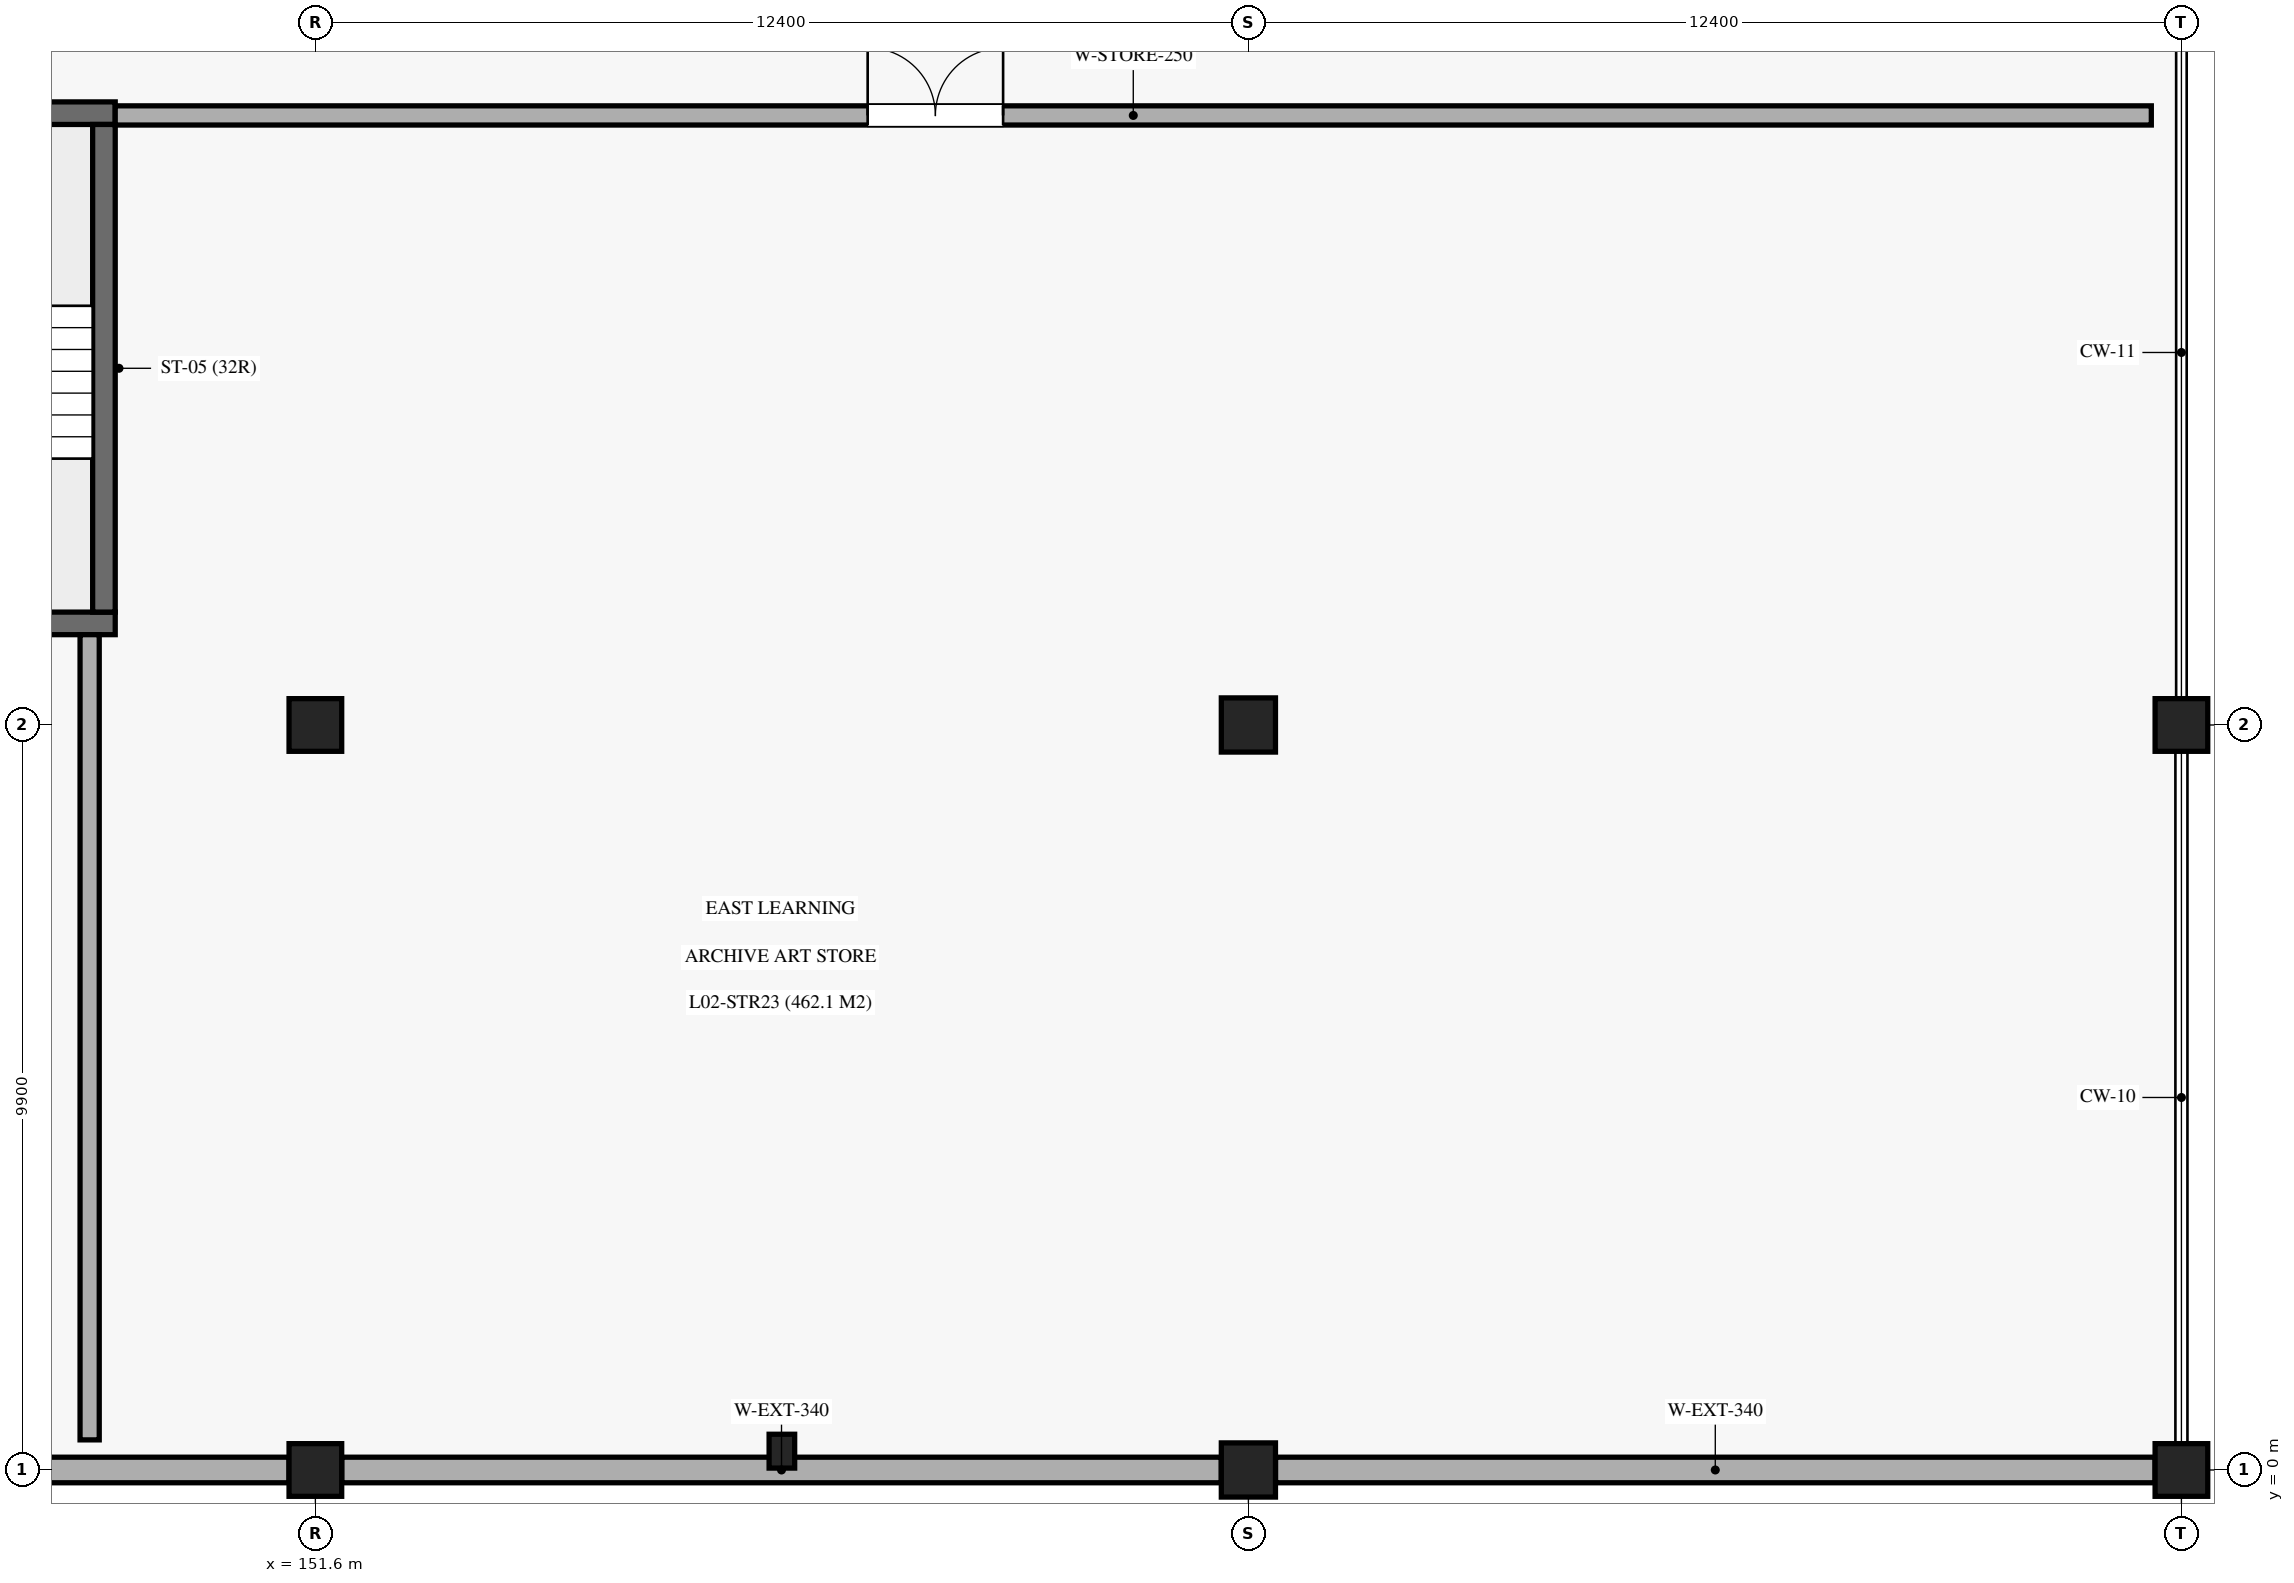
"""IFC4 building model, lengths in metres.
Left out: names, types, materials, properties, quantities, classifications, styles, units other than length and angle.
Written with IfcOpenShell. Run it as: python <this file> out.ifc"""

import sys

from ifc_helpers import new_model, si_unit, direction, frame, frame_2d, origin, origin_2d, place, context, subcontext, project, spatial, rectangle, circle, extrude, element, fill, save


model = new_model("IFC4")
c1 = context("Model", 3, precision=1e-05, world=origin(), true_north=direction((0.0, 1.0)))
c2 = subcontext(c1, "Body", "Model", "MODEL_VIEW")
j1 = project(units=[si_unit("LENGTHUNIT", "METRE"), si_unit("PLANEANGLEUNIT", "RADIAN")], contexts=[c1])
p1 = place(None, origin())
s1 = spatial("IfcSite", under=j1, at=p1, CompositionType="ELEMENT")
p2 = place(p1, origin())
s2 = spatial("IfcBuilding", under=s1, at=p2, CompositionType="ELEMENT")
p3 = place(p2, frame((0.0, 0.0, 10.88)))
s3 = spatial("IfcBuildingStorey", under=s2, at=p3, CompositionType="ELEMENT", Elevation=10.88)
for number, where, z_axis, x_axis in (
    (1, (151.6, 0.0, 0.0), (0.0, 0.0, 1.0), (1.0, 0.0, 0.0)),
    (2, (151.6, 9.9, 0.0), (0.0, 0.0, 1.0), (1.0, 0.0, 0.0)),
):
    element("IfcColumn", number, at=place(p3, frame(where, z_axis=z_axis, x_axis=x_axis)), inside=s3, PredefinedType="COLUMN", context=c2, shape_type="SweptSolid", body=[
        extrude(rectangle(XDim=0.7, YDim=0.7, at=origin_2d()), origin(), (0.0, 0.0, 1.0), 5.44),
    ])
for number, where, z_axis, x_axis in (
    (3, (164.0, 0.0, 0.0), (0.0, 0.0, 1.0), (1.0, 0.0, 0.0)),
    (4, (164.0, 9.9, 0.0), (0.0, 0.0, 1.0), (1.0, 0.0, 0.0)),
):
    element("IfcColumn", number, at=place(p3, frame(where, z_axis=z_axis, x_axis=x_axis)), inside=s3, PredefinedType="COLUMN", context=c2, shape_type="SweptSolid", body=[
        extrude(circle(Radius=0.36, at=origin_2d()), origin(), (0.0, 0.0, 1.0), 5.44),
    ])
for number, where, z_axis, x_axis in (
    (5, (176.4, 0.0, 0.0), (0.0, 0.0, 1.0), (1.0, 0.0, 0.0)),
    (6, (176.4, 9.9, 0.0), (0.0, 0.0, 1.0), (1.0, 0.0, 0.0)),
):
    element("IfcColumn", number, at=place(p3, frame(where, z_axis=z_axis, x_axis=x_axis)), inside=s3, PredefinedType="COLUMN", context=c2, shape_type="SweptSolid", body=[
        extrude(rectangle(XDim=0.7, YDim=0.7, at=origin_2d()), origin(), (0.0, 0.0, 1.0), 5.44),
    ])
p4 = place(p3, frame((157.8, 0.25, 0.0), z_axis=(0.0, 0.0, 1.0), x_axis=(1.0, 0.0, 0.0)))
e7 = element("IfcColumn", 7, at=p4, inside=s3, PredefinedType="PILASTER", context=c2, shape_type="SweptSolid", body=[
    extrude(rectangle(XDim=0.34, YDim=0.45, at=origin_2d()), origin(), (0.0, 0.0, 1.0), 5.44),
])
p5 = place(p3, frame((139.55, 0.0, 0.0), z_axis=(0.0, 0.0, 1.0), x_axis=(1.0, 0.0, 0.0)))
e8 = element("IfcWall", 8, at=p5, inside=s3, PredefinedType="SOLIDWALL", context=c2, shape_type="SweptSolid", body=[
    extrude(rectangle(XDim=11.7, YDim=0.34, at=frame_2d((5.85, 0.0))), origin(), (0.0, 0.0, 1.0), 4.38),
])
for number, where, z_axis, x_axis in (
    (9, (151.95, 0.0, 0.0), (0.0, 0.0, 1.0), (1.0, 0.0, 0.0)),
    (10, (164.36, 0.0, 0.0), (0.0, 0.0, 1.0), (1.0, 0.0, 0.0)),
):
    element("IfcWall", number, at=place(p3, frame(where, z_axis=z_axis, x_axis=x_axis)), inside=s3, PredefinedType="SOLIDWALL", context=c2, shape_type="SweptSolid", body=[
        extrude(rectangle(XDim=11.69, YDim=0.34, at=frame_2d((5.845, 0.0))), origin(), (0.0, 0.0, 1.0), 4.38),
    ])
for number, where, z_axis, x_axis in (
    (11, (141.86, 11.25, 0.0), (0.0, 0.0, 1.0), (1.0, 0.0, 0.0)),
    (12, (141.86, 18.03, 0.0), (0.0, 0.0, 1.0), (1.0, 0.0, 0.0)),
):
    element("IfcWall", number, at=place(p3, frame(where, z_axis=z_axis, x_axis=x_axis)), inside=s3, PredefinedType="SHEAR", context=c2, shape_type="SweptSolid", body=[
        extrude(rectangle(XDim=7.08, YDim=0.3, at=frame_2d((3.54, 0.0))), origin(), (0.0, 0.0, 1.0), 5.16),
    ])
p6 = place(p3, frame((148.79, 11.4, 0.0), z_axis=(0.0, 0.0, 1.0), x_axis=(0.0, 1.0, 0.0)))
e13 = element("IfcWall", 13, at=p6, inside=s3, PredefinedType="SHEAR", context=c2, shape_type="SweptSolid", body=[
    extrude(rectangle(XDim=6.48, YDim=0.3, at=frame_2d((3.24, 0.0))), origin(), (0.0, 0.0, 1.0), 5.16),
])
p7 = place(p3, frame((148.94, 18.0, 0.0), z_axis=(0.0, 0.0, 1.0), x_axis=(1.0, 0.0, 0.0)))
e14 = element("IfcWall", 14, at=p7, inside=s3, PredefinedType="SOLIDWALL", context=c2, shape_type="SweptSolid", body=[
    extrude(rectangle(XDim=27.06, YDim=0.255, at=frame_2d((13.53, 0.0))), origin(), (0.0, 0.0, 1.0), 4.28),
])
p8 = place(p7, frame((10.0, 0.0, 0.0)))
e15 = element("IfcOpeningElement", 15, at=p8, cuts=e14, PredefinedType="OPENING", context=c2, shape_type="SweptSolid", body=[
    extrude(rectangle(XDim=1.8, YDim=2.35, at=frame_2d((0.9, 1.175))), frame((0.0, 0.137, 0.0), z_axis=(0.0, -1.0, 0.0), x_axis=(1.0, 0.0, 0.0)), (0.0, 0.0, 1.0), 0.275),
])
p9 = place(p3, frame((148.6, 0.4, 0.0), z_axis=(0.0, 0.0, 1.0), x_axis=(0.0, 1.0, 0.0)))
e16 = element("IfcWall", 16, at=p9, inside=s3, PredefinedType="SOLIDWALL", context=c2, shape_type="SweptSolid", body=[
    extrude(rectangle(XDim=10.7, YDim=0.255, at=frame_2d((5.35, 0.0))), origin(), (0.0, 0.0, 1.0), 4.28),
])
p10 = place(p8, origin())
e17 = element("IfcDoor", 17, at=p10, inside=s3, OperationType="DOUBLE_DOOR_SINGLE_SWING", PredefinedType="DOOR", context=c2, shape_type="SweptSolid", body=[
    extrude(rectangle(XDim=1.8, YDim=2.35, at=frame_2d((0.9, 1.175))), frame((0.0, 0.025, 0.0), z_axis=(0.0, -1.0, 0.0), x_axis=(1.0, 0.0, 0.0)), (0.0, 0.0, 1.0), 0.05),
])
fill(e15, e17)
save(model, sys.argv[1])
